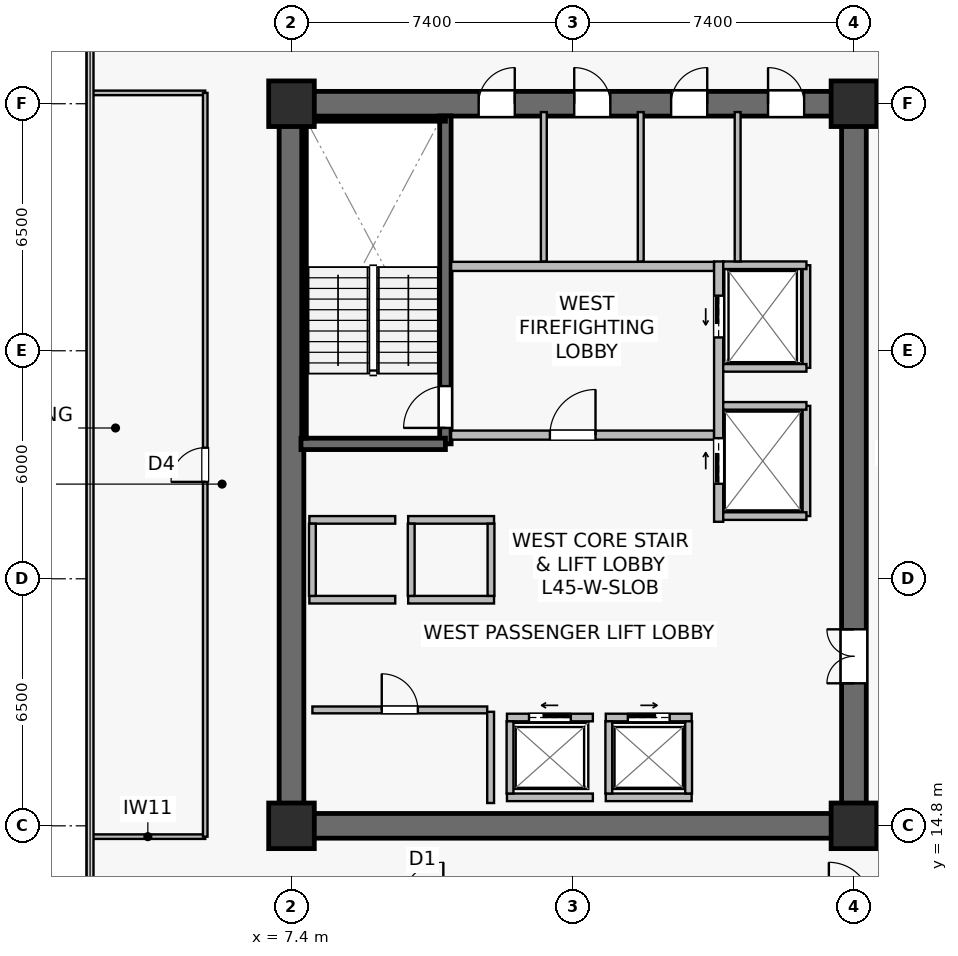
"""IFC4 building model, lengths in metres.
Left out: names, types, materials, properties, quantities, classifications, styles, units other than length and angle.
Written with IfcOpenShell. Run it as: python <this file> out.ifc"""

import sys

from ifc_helpers import new_model, si_unit, direction, frame, frame_2d, origin, origin_2d, place, context, subcontext, project, spatial, rectangle, extrude, source, transform, mapped, element, fill, save


model = new_model("IFC4")
c1 = context("Model", 3, precision=1e-05, world=origin(), true_north=direction((0.0, 1.0)))
c2 = subcontext(c1, "Body", "Model", "MODEL_VIEW")
j1 = project(units=[si_unit("LENGTHUNIT", "METRE"), si_unit("PLANEANGLEUNIT", "RADIAN")], contexts=[c1])
p1 = place(None, origin())
s1 = spatial("IfcSite", under=j1, at=p1, CompositionType="ELEMENT")
p2 = place(p1, origin())
s2 = spatial("IfcBuilding", under=s1, at=p2, CompositionType="ELEMENT")
p3 = place(p2, frame((0.0, 0.0, 187.1)))
s3 = spatial("IfcBuildingStorey", under=s2, at=p3, CompositionType="ELEMENT", Elevation=187.1)
p4 = place(p3, frame((7.075, 14.8, 0.0), z_axis=(0.0, 0.0, 1.0), x_axis=(1.0, 0.0, 0.0)))
e1 = element("IfcWall", 1, at=p4, inside=s3, PredefinedType="SHEAR", context=c2, shape_type="SweptSolid", body=[
    extrude(rectangle(XDim=15.45, YDim=0.65, at=frame_2d((7.725, 0.0))), origin(), (0.0, 0.0, 1.0), 3.79),
])
p5 = place(p3, frame((7.075, 33.8, 0.0), z_axis=(0.0, 0.0, 1.0), x_axis=(1.0, 0.0, 0.0)))
e2 = element("IfcWall", 2, at=p5, inside=s3, PredefinedType="SHEAR", context=c2, shape_type="SweptSolid", body=[
    extrude(rectangle(XDim=15.45, YDim=0.65, at=frame_2d((7.725, 0.0))), origin(), (0.0, 0.0, 1.0), 3.79),
])
p6 = place(p5, frame((5.25, 0.0, 0.0)))
e3 = element("IfcOpeningElement", 3, at=p6, cuts=e2, PredefinedType="OPENING", context=c2, shape_type="SweptSolid", body=[
    extrude(rectangle(XDim=0.95, YDim=2.15, at=frame_2d((0.475, 1.075))), frame((0.0, 0.335, 0.0), z_axis=(0.0, -1.0, 0.0), x_axis=(1.0, 0.0, 0.0)), (0.0, 0.0, 1.0), 0.67),
])
p7 = place(p5, frame((7.765, 0.0, 0.0)))
e4 = element("IfcOpeningElement", 4, at=p7, cuts=e2, PredefinedType="OPENING", context=c2, shape_type="SweptSolid", body=[
    extrude(rectangle(XDim=0.95, YDim=2.15, at=frame_2d((0.475, 1.075))), frame((0.0, 0.335, 0.0), z_axis=(0.0, -1.0, 0.0), x_axis=(1.0, 0.0, 0.0)), (0.0, 0.0, 1.0), 0.67),
])
p8 = place(p5, frame((10.315, 0.0, 0.0)))
e5 = element("IfcOpeningElement", 5, at=p8, cuts=e2, PredefinedType="OPENING", context=c2, shape_type="SweptSolid", body=[
    extrude(rectangle(XDim=0.95, YDim=2.15, at=frame_2d((0.475, 1.075))), frame((0.0, 0.335, 0.0), z_axis=(0.0, -1.0, 0.0), x_axis=(1.0, 0.0, 0.0)), (0.0, 0.0, 1.0), 0.67),
])
p9 = place(p5, frame((12.865, 0.0, 0.0)))
e6 = element("IfcOpeningElement", 6, at=p9, cuts=e2, PredefinedType="OPENING", context=c2, shape_type="SweptSolid", body=[
    extrude(rectangle(XDim=0.95, YDim=2.15, at=frame_2d((0.475, 1.075))), frame((0.0, 0.335, 0.0), z_axis=(0.0, -1.0, 0.0), x_axis=(1.0, 0.0, 0.0)), (0.0, 0.0, 1.0), 0.67),
])
p10 = place(p3, frame((7.4, 15.125, 0.0), z_axis=(0.0, 0.0, 1.0), x_axis=(0.0, 1.0, 0.0)))
e7 = element("IfcWall", 7, at=p10, inside=s3, PredefinedType="SHEAR", context=c2, shape_type="SweptSolid", body=[
    extrude(rectangle(XDim=18.35, YDim=0.65, at=frame_2d((9.175, 0.0))), origin(), (0.0, 0.0, 1.0), 3.79),
])
p11 = place(p3, frame((22.2, 15.125, 0.0), z_axis=(0.0, 0.0, 1.0), x_axis=(0.0, 1.0, 0.0)))
e8 = element("IfcWall", 8, at=p11, inside=s3, PredefinedType="SHEAR", context=c2, shape_type="SweptSolid", body=[
    extrude(rectangle(XDim=18.35, YDim=0.65, at=frame_2d((9.175, 0.0))), origin(), (0.0, 0.0, 1.0), 3.79),
])
p12 = place(p11, frame((3.425, 0.0, 0.0)))
e9 = element("IfcOpeningElement", 9, at=p12, cuts=e8, PredefinedType="OPENING", context=c2, shape_type="SweptSolid", body=[
    extrude(rectangle(XDim=1.42, YDim=2.2, at=frame_2d((0.71, 1.1))), frame((0.0, 0.335, 0.0), z_axis=(0.0, -1.0, 0.0), x_axis=(1.0, 0.0, 0.0)), (0.0, 0.0, 1.0), 0.67),
])
p13 = place(p3, frame((11.45, 24.85, 0.0), z_axis=(0.0, 0.0, 1.0), x_axis=(0.0, 1.0, 0.0)))
e10 = element("IfcWall", 10, at=p13, inside=s3, PredefinedType="SHEAR", context=c2, shape_type="SweptSolid", body=[
    extrude(rectangle(XDim=8.63, YDim=0.3, at=frame_2d((4.315, 0.0))), origin(), (0.0, 0.0, 1.0), 3.79),
])
p14 = place(p13, frame((0.42, 0.0, 0.0)))
e11 = element("IfcOpeningElement", 11, at=p14, cuts=e10, PredefinedType="OPENING", context=c2, shape_type="SweptSolid", body=[
    extrude(rectangle(XDim=1.1, YDim=2.15, at=frame_2d((0.55, 1.075))), frame((0.0, 0.16, 0.0), z_axis=(0.0, -1.0, 0.0), x_axis=(1.0, 0.0, 0.0)), (0.0, 0.0, 1.0), 0.32),
])
p15 = place(p3, frame((7.65, 24.85, 0.0), z_axis=(0.0, 0.0, 1.0), x_axis=(1.0, 0.0, 0.0)))
e12 = element("IfcWall", 12, at=p15, inside=s3, PredefinedType="SHEAR", context=c2, shape_type="SweptSolid", body=[
    extrude(rectangle(XDim=3.8, YDim=0.3, at=frame_2d((1.9, 0.0))), origin(), (0.0, 0.0, 1.0), 3.79),
])
p16 = place(p3, frame((7.73, 33.4, 0.0), z_axis=(0.0, 0.0, 1.0), x_axis=(1.0, 0.0, 0.0)))
e13 = element("IfcWall", 13, at=p16, inside=s3, PredefinedType="SOLIDWALL", context=c2, shape_type="SweptSolid", body=[
    extrude(rectangle(XDim=3.72, YDim=0.12, at=frame_2d((1.86, 0.0))), origin(), (0.0, 0.0, 1.0), 3.79),
])
p17 = place(p3, frame((7.73, 25.0, 0.0), z_axis=(0.0, 0.0, 1.0), x_axis=(0.0, 1.0, 0.0)))
e14 = element("IfcWall", 14, at=p17, inside=s3, PredefinedType="SOLIDWALL", context=c2, shape_type="SweptSolid", body=[
    extrude(rectangle(XDim=8.32, YDim=0.12, at=frame_2d((4.16, 0.0))), origin(), (0.0, 0.0, 1.0), 3.79),
])
m1 = source(origin(), c2, "Body", "SweptSolid", [
    extrude(rectangle(XDim=1.2, YDim=1.2, at=origin_2d()), origin(), (0.0, 0.0, 1.0), 4.1),
])
for number, where, z_axis, x_axis in (
    (15, (7.4, 14.8, 0.0), (0.0, 0.0, 1.0), (1.0, 0.0, 0.0)),
    (16, (22.2, 14.8, 0.0), (0.0, 0.0, 1.0), (1.0, 0.0, 0.0)),
    (17, (7.4, 33.8, 0.0), (0.0, 0.0, 1.0), (1.0, 0.0, 0.0)),
    (18, (22.2, 33.8, 0.0), (0.0, 0.0, 1.0), (1.0, 0.0, 0.0)),
):
    element("IfcColumn", number, at=place(p3, frame(where, z_axis=z_axis, x_axis=x_axis)), inside=s3, PredefinedType="COLUMN", context=c2, shape_type="MappedRepresentation", body=[
        mapped(m1, transform((0.0, 0.0, 0.0), scale=1.0)),
    ])
p18 = place(p3, frame((11.6, 25.08, 0.0), z_axis=(0.0, 0.0, 1.0), x_axis=(1.0, 0.0, 0.0)))
e19 = element("IfcWall", 19, at=p18, inside=s3, PredefinedType="SOLIDWALL", context=c2, shape_type="SweptSolid", body=[
    extrude(rectangle(XDim=6.92, YDim=0.24, at=frame_2d((3.46, 0.0))), origin(), (0.0, 0.0, 1.0), 3.187),
])
p19 = place(p18, frame((2.6, 0.0, 0.0)))
e20 = element("IfcOpeningElement", 20, at=p19, cuts=e19, PredefinedType="OPENING", context=c2, shape_type="SweptSolid", body=[
    extrude(rectangle(XDim=1.2, YDim=2.16, at=frame_2d((0.6, 1.08))), frame((0.0, 0.13, 0.0), z_axis=(0.0, -1.0, 0.0), x_axis=(1.0, 0.0, 0.0)), (0.0, 0.0, 1.0), 0.26),
])
p20 = place(p3, frame((11.6, 29.52, 0.0), z_axis=(0.0, 0.0, 1.0), x_axis=(1.0, 0.0, 0.0)))
e21 = element("IfcWall", 21, at=p20, inside=s3, PredefinedType="SOLIDWALL", context=c2, shape_type="SweptSolid", body=[
    extrude(rectangle(XDim=6.92, YDim=0.24, at=frame_2d((3.46, 0.0))), origin(), (0.0, 0.0, 1.0), 3.187),
])
p21 = place(p3, frame((18.64, 22.8, 0.0), z_axis=(0.0, 0.0, 1.0), x_axis=(0.0, 1.0, 0.0)))
e22 = element("IfcWall", 22, at=p21, inside=s3, PredefinedType="SOLIDWALL", context=c2, shape_type="SweptSolid", body=[
    extrude(rectangle(XDim=6.85, YDim=0.24, at=frame_2d((3.425, 0.0))), origin(), (0.0, 0.0, 1.0), 2.925),
])
p22 = place(p21, frame((4.85, 0.0, 0.0)))
e23 = element("IfcOpeningElement", 23, at=p22, cuts=e22, PredefinedType="OPENING", context=c2, shape_type="SweptSolid", body=[
    extrude(rectangle(XDim=1.1, YDim=2.22, at=frame_2d((0.55, 1.11))), frame((0.0, 0.13, 0.0), z_axis=(0.0, -1.0, 0.0), x_axis=(1.0, 0.0, 0.0)), (0.0, 0.0, 1.0), 0.26),
])
p23 = place(p21, frame((1.0, 0.0, 0.0)))
e24 = element("IfcOpeningElement", 24, at=p23, cuts=e22, PredefinedType="OPENING", context=c2, shape_type="SweptSolid", body=[
    extrude(rectangle(XDim=1.2, YDim=2.22, at=frame_2d((0.6, 1.11))), frame((0.0, 0.13, 0.0), z_axis=(0.0, -1.0, 0.0), x_axis=(1.0, 0.0, 0.0)), (0.0, 0.0, 1.0), 0.26),
])
p24 = place(p3, frame((13.07, 17.65, 0.0), z_axis=(0.0, 0.0, 1.0), x_axis=(1.0, 0.0, 0.0)))
e25 = element("IfcWall", 25, at=p24, inside=s3, PredefinedType="SOLIDWALL", context=c2, shape_type="SweptSolid", body=[
    extrude(rectangle(XDim=2.26, YDim=0.2, at=frame_2d((1.13, 0.0))), origin(), (0.0, 0.0, 1.0), 3.187),
])
p25 = place(p24, frame((0.58, 0.0, 0.0)))
e26 = element("IfcOpeningElement", 26, at=p25, cuts=e25, PredefinedType="OPENING", context=c2, shape_type="SweptSolid", body=[
    extrude(rectangle(XDim=1.1, YDim=2.22, at=frame_2d((0.55, 1.11))), frame((0.0, 0.11, 0.0), z_axis=(0.0, -1.0, 0.0), x_axis=(1.0, 0.0, 0.0)), (0.0, 0.0, 1.0), 0.22),
])
p26 = place(p3, frame((13.07, 15.55, 0.0), z_axis=(0.0, 0.0, 1.0), x_axis=(1.0, 0.0, 0.0)))
e27 = element("IfcWall", 27, at=p26, inside=s3, PredefinedType="SOLIDWALL", context=c2, shape_type="SweptSolid", body=[
    extrude(rectangle(XDim=2.26, YDim=0.2, at=frame_2d((1.13, 0.0))), origin(), (0.0, 0.0, 1.0), 3.187),
])
p27 = place(p3, frame((13.15, 15.65, 0.0), z_axis=(0.0, 0.0, 1.0), x_axis=(0.0, 1.0, 0.0)))
e28 = element("IfcWall", 28, at=p27, inside=s3, PredefinedType="SOLIDWALL", context=c2, shape_type="SweptSolid", body=[
    extrude(rectangle(XDim=1.9, YDim=0.18, at=frame_2d((0.95, 0.0))), origin(), (0.0, 0.0, 1.0), 3.79),
])
p28 = place(p3, frame((15.67, 17.65, 0.0), z_axis=(0.0, 0.0, 1.0), x_axis=(1.0, 0.0, 0.0)))
e29 = element("IfcWall", 29, at=p28, inside=s3, PredefinedType="SOLIDWALL", context=c2, shape_type="SweptSolid", body=[
    extrude(rectangle(XDim=2.26, YDim=0.2, at=frame_2d((1.13, 0.0))), origin(), (0.0, 0.0, 1.0), 3.79),
])
p29 = place(p28, frame((0.58, 0.0, 0.0)))
e30 = element("IfcOpeningElement", 30, at=p29, cuts=e29, PredefinedType="OPENING", context=c2, shape_type="SweptSolid", body=[
    extrude(rectangle(XDim=1.1, YDim=2.22, at=frame_2d((0.55, 1.11))), frame((0.0, 0.11, 0.0), z_axis=(0.0, -1.0, 0.0), x_axis=(1.0, 0.0, 0.0)), (0.0, 0.0, 1.0), 0.22),
])
p30 = place(p3, frame((15.67, 15.55, 0.0), z_axis=(0.0, 0.0, 1.0), x_axis=(1.0, 0.0, 0.0)))
e31 = element("IfcWall", 31, at=p30, inside=s3, PredefinedType="SOLIDWALL", context=c2, shape_type="SweptSolid", body=[
    extrude(rectangle(XDim=2.26, YDim=0.2, at=frame_2d((1.13, 0.0))), origin(), (0.0, 0.0, 1.0), 3.79),
])
for number, where, z_axis, x_axis in (
    (32, (15.75, 15.65, 0.0), (0.0, 0.0, 1.0), (0.0, 1.0, 0.0)),
    (33, (17.85, 15.65, 0.0), (0.0, 0.0, 1.0), (0.0, 1.0, 0.0)),
):
    element("IfcWall", number, at=place(p3, frame(where, z_axis=z_axis, x_axis=x_axis)), inside=s3, PredefinedType="SOLIDWALL", context=c2, shape_type="SweptSolid", body=[
        extrude(rectangle(XDim=1.9, YDim=0.18, at=frame_2d((0.95, 0.0))), origin(), (0.0, 0.0, 1.0), 3.79),
    ])
for number, where, z_axis, x_axis in (
    (34, (7.87, 20.75, 0.0), (0.0, 0.0, 1.0), (1.0, 0.0, 0.0)),
    (35, (7.87, 22.85, 0.0), (0.0, 0.0, 1.0), (1.0, 0.0, 0.0)),
):
    element("IfcWall", number, at=place(p3, frame(where, z_axis=z_axis, x_axis=x_axis)), inside=s3, PredefinedType="SOLIDWALL", context=c2, shape_type="SweptSolid", body=[
        extrude(rectangle(XDim=2.26, YDim=0.2, at=frame_2d((1.13, 0.0))), origin(), (0.0, 0.0, 1.0), 3.79),
    ])
p31 = place(p3, frame((7.95, 20.85, 0.0), z_axis=(0.0, 0.0, 1.0), x_axis=(0.0, 1.0, 0.0)))
e36 = element("IfcWall", 36, at=p31, inside=s3, PredefinedType="SOLIDWALL", context=c2, shape_type="SweptSolid", body=[
    extrude(rectangle(XDim=1.9, YDim=0.18, at=frame_2d((0.95, 0.0))), origin(), (0.0, 0.0, 1.0), 3.79),
])
for number, where, z_axis, x_axis in (
    (37, (10.47, 20.75, 0.0), (0.0, 0.0, 1.0), (1.0, 0.0, 0.0)),
    (38, (10.47, 22.85, 0.0), (0.0, 0.0, 1.0), (1.0, 0.0, 0.0)),
):
    element("IfcWall", number, at=place(p3, frame(where, z_axis=z_axis, x_axis=x_axis)), inside=s3, PredefinedType="SOLIDWALL", context=c2, shape_type="SweptSolid", body=[
        extrude(rectangle(XDim=2.26, YDim=0.2, at=frame_2d((1.13, 0.0))), origin(), (0.0, 0.0, 1.0), 3.79),
    ])
for number, where, z_axis, x_axis in (
    (39, (10.55, 20.85, 0.0), (0.0, 0.0, 1.0), (0.0, 1.0, 0.0)),
    (40, (12.65, 20.85, 0.0), (0.0, 0.0, 1.0), (0.0, 1.0, 0.0)),
):
    element("IfcWall", number, at=place(p3, frame(where, z_axis=z_axis, x_axis=x_axis)), inside=s3, PredefinedType="SOLIDWALL", context=c2, shape_type="SweptSolid", body=[
        extrude(rectangle(XDim=1.9, YDim=0.18, at=frame_2d((0.95, 0.0))), origin(), (0.0, 0.0, 1.0), 3.79),
    ])
p32 = place(p3, frame((20.95, 26.85, 0.0), z_axis=(0.0, 0.0, 1.0), x_axis=(0.0, 1.0, 0.0)))
e41 = element("IfcWall", 41, at=p32, inside=s3, PredefinedType="SOLIDWALL", context=c2, shape_type="SweptSolid", body=[
    extrude(rectangle(XDim=2.7, YDim=0.2, at=frame_2d((1.35, 0.0))), origin(), (0.0, 0.0, 1.0), 3.79),
])
p33 = place(p3, frame((18.76, 29.55, 0.0), z_axis=(0.0, 0.0, 1.0), x_axis=(1.0, 0.0, 0.0)))
e42 = element("IfcWall", 42, at=p33, inside=s3, PredefinedType="SOLIDWALL", context=c2, shape_type="SweptSolid", body=[
    extrude(rectangle(XDim=2.19, YDim=0.2, at=frame_2d((1.095, 0.0))), origin(), (0.0, 0.0, 1.0), 3.79),
])
p34 = place(p3, frame((18.76, 26.85, 0.0), z_axis=(0.0, 0.0, 1.0), x_axis=(1.0, 0.0, 0.0)))
e43 = element("IfcWall", 43, at=p34, inside=s3, PredefinedType="SOLIDWALL", context=c2, shape_type="SweptSolid", body=[
    extrude(rectangle(XDim=2.19, YDim=0.2, at=frame_2d((1.095, 0.0))), origin(), (0.0, 0.0, 1.0), 3.187),
])
p35 = place(p3, frame((20.95, 22.95, 0.0), z_axis=(0.0, 0.0, 1.0), x_axis=(0.0, 1.0, 0.0)))
e44 = element("IfcWall", 44, at=p35, inside=s3, PredefinedType="SOLIDWALL", context=c2, shape_type="SweptSolid", body=[
    extrude(rectangle(XDim=2.9, YDim=0.2, at=frame_2d((1.45, 0.0))), origin(), (0.0, 0.0, 1.0), 2.925),
])
for number, where, z_axis, x_axis in (
    (45, (18.76, 25.85, 0.0), (0.0, 0.0, 1.0), (1.0, 0.0, 0.0)),
    (46, (18.76, 22.95, 0.0), (0.0, 0.0, 1.0), (1.0, 0.0, 0.0)),
):
    element("IfcWall", number, at=place(p3, frame(where, z_axis=z_axis, x_axis=x_axis)), inside=s3, PredefinedType="SOLIDWALL", context=c2, shape_type="SweptSolid", body=[
        extrude(rectangle(XDim=2.19, YDim=0.2, at=frame_2d((1.095, 0.0))), origin(), (0.0, 0.0, 1.0), 3.79),
    ])
p36 = place(p3, frame((7.95, 17.85, 0.0), z_axis=(0.0, 0.0, 1.0), x_axis=(1.0, 0.0, 0.0)))
e47 = element("IfcWall", 47, at=p36, inside=s3, PredefinedType="SOLIDWALL", context=c2, shape_type="SweptSolid", body=[
    extrude(rectangle(XDim=4.6, YDim=0.18, at=frame_2d((2.3, 0.0))), origin(), (0.0, 0.0, 1.0), 3.79),
])
p37 = place(p36, frame((1.825, 0.0, 0.0)))
e48 = element("IfcOpeningElement", 48, at=p37, cuts=e47, PredefinedType="OPENING", context=c2, shape_type="SweptSolid", body=[
    extrude(rectangle(XDim=0.95, YDim=2.15, at=frame_2d((0.475, 1.075))), frame((0.0, 0.1, 0.0), z_axis=(0.0, -1.0, 0.0), x_axis=(1.0, 0.0, 0.0)), (0.0, 0.0, 1.0), 0.2),
])
p38 = place(p3, frame((12.64, 15.4, 0.0), z_axis=(0.0, 0.0, 1.0), x_axis=(0.0, 1.0, 0.0)))
e49 = element("IfcWall", 49, at=p38, inside=s3, PredefinedType="SOLIDWALL", context=c2, shape_type="SweptSolid", body=[
    extrude(rectangle(XDim=2.4, YDim=0.18, at=frame_2d((1.2, 0.0))), origin(), (0.0, 0.0, 1.0), 3.79),
])
for number, where, z_axis, x_axis in (
    (50, (14.04, 29.65, 0.0), (0.0, 0.0, 1.0), (0.0, 1.0, 0.0)),
    (51, (16.59, 29.65, 0.0), (0.0, 0.0, 1.0), (0.0, 1.0, 0.0)),
    (52, (19.14, 29.65, 0.0), (0.0, 0.0, 1.0), (0.0, 1.0, 0.0)),
):
    element("IfcWall", number, at=place(p3, frame(where, z_axis=z_axis, x_axis=x_axis)), inside=s3, PredefinedType="PLUMBINGWALL", context=c2, shape_type="SweptSolid", body=[
        extrude(rectangle(XDim=3.93, YDim=0.155, at=frame_2d((1.965, 0.0))), origin(), (0.0, 0.0, 1.0), 3.79),
    ])
for number, where, z_axis, x_axis in (
    (53, (2.11, 14.515, 0.0), (0.0, 0.0, 1.0), (1.0, 0.0, 0.0)),
    (54, (2.11, 34.085, 0.0), (0.0, 0.0, 1.0), (1.0, 0.0, 0.0)),
):
    element("IfcWall", number, at=place(p3, frame(where, z_axis=z_axis, x_axis=x_axis)), inside=s3, PredefinedType="PARTITIONING", context=c2, shape_type="SweptSolid", body=[
        extrude(rectangle(XDim=3.02, YDim=0.12, at=frame_2d((1.51, 0.0))), origin(), (0.0, 0.0, 1.0), 3.79),
    ])
p39 = place(p3, frame((5.13, 14.515, 0.0), z_axis=(0.0, 0.0, 1.0), x_axis=(0.0, 1.0, 0.0)))
e55 = element("IfcWall", 55, at=p39, inside=s3, PredefinedType="PARTITIONING", context=c2, shape_type="SweptSolid", body=[
    extrude(rectangle(XDim=19.57, YDim=0.12, at=frame_2d((9.785, 0.0))), origin(), (0.0, 0.0, 1.0), 3.79),
])
p40 = place(p39, frame((9.335, 0.0, 0.0)))
e56 = element("IfcOpeningElement", 56, at=p40, cuts=e55, PredefinedType="OPENING", context=c2, shape_type="SweptSolid", body=[
    extrude(rectangle(XDim=0.9, YDim=2.1, at=frame_2d((0.45, 1.05))), frame((0.0, 0.07, 0.0), z_axis=(0.0, -1.0, 0.0), x_axis=(1.0, 0.0, 0.0)), (0.0, 0.0, 1.0), 0.14),
])
m2 = source(origin(), c2, "Body", "SweptSolid", [
    extrude(rectangle(XDim=1.1, YDim=2.15, at=frame_2d((0.55, 1.075))), frame((0.0, 0.025, 0.0), z_axis=(0.0, -1.0, 0.0), x_axis=(1.0, 0.0, 0.0)), (0.0, 0.0, 1.0), 0.05),
])
p41 = place(p14, origin())
e57 = element("IfcDoor", 57, at=p41, inside=s3, OperationType="SINGLE_SWING_LEFT", PredefinedType="DOOR", context=c2, shape_type="MappedRepresentation", body=[
    mapped(m2, transform((0.0, 0.0, 0.0), scale=1.0)),
])
fill(e11, e57)
m3 = source(origin(), c2, "Body", "SweptSolid", [
    extrude(rectangle(XDim=1.2, YDim=2.16, at=frame_2d((0.6, 1.08))), frame((0.0, 0.025, 0.0), z_axis=(0.0, -1.0, 0.0), x_axis=(1.0, 0.0, 0.0)), (0.0, 0.0, 1.0), 0.05),
])
p42 = place(p19, origin())
e58 = element("IfcDoor", 58, at=p42, inside=s3, OperationType="SINGLE_SWING_RIGHT", PredefinedType="DOOR", context=c2, shape_type="MappedRepresentation", body=[
    mapped(m3, transform((0.0, 0.0, 0.0), scale=1.0)),
])
fill(e20, e58)
m4 = source(origin(), c2, "Body", "SweptSolid", [
    extrude(rectangle(XDim=1.1, YDim=2.22, at=frame_2d((0.55, 1.11))), frame((0.0, 0.025, 0.0), z_axis=(0.0, -1.0, 0.0), x_axis=(1.0, 0.0, 0.0)), (0.0, 0.0, 1.0), 0.05),
])
p43 = place(p25, origin())
e59 = element("IfcDoor", 59, at=p43, inside=s3, OperationType="SLIDING_TO_LEFT", PredefinedType="USERDEFINED", context=c2, shape_type="MappedRepresentation", body=[
    mapped(m4, transform((0.0, 0.0, 0.0), scale=1.0)),
])
fill(e26, e59)
p44 = place(p29, origin())
e60 = element("IfcDoor", 60, at=p44, inside=s3, OperationType="SLIDING_TO_RIGHT", PredefinedType="USERDEFINED", context=c2, shape_type="MappedRepresentation", body=[
    mapped(m4, transform((0.0, 0.0, 0.0), scale=1.0)),
])
fill(e30, e60)
p45 = place(p22, origin())
e61 = element("IfcDoor", 61, at=p45, inside=s3, OperationType="SLIDING_TO_LEFT", PredefinedType="USERDEFINED", context=c2, shape_type="MappedRepresentation", body=[
    mapped(m4, transform((0.0, 0.0, 0.0), scale=1.0)),
])
fill(e23, e61)
m5 = source(origin(), c2, "Body", "SweptSolid", [
    extrude(rectangle(XDim=1.2, YDim=2.22, at=frame_2d((0.6, 1.11))), frame((0.0, 0.025, 0.0), z_axis=(0.0, -1.0, 0.0), x_axis=(1.0, 0.0, 0.0)), (0.0, 0.0, 1.0), 0.05),
])
p46 = place(p23, origin())
e62 = element("IfcDoor", 62, at=p46, inside=s3, OperationType="SLIDING_TO_RIGHT", PredefinedType="USERDEFINED", context=c2, shape_type="MappedRepresentation", body=[
    mapped(m5, transform((0.0, 0.0, 0.0), scale=1.0)),
])
fill(e24, e62)
m6 = source(origin(), c2, "Body", "SweptSolid", [
    extrude(rectangle(XDim=0.95, YDim=2.15, at=frame_2d((0.475, 1.075))), frame((0.0, 0.025, 0.0), z_axis=(0.0, -1.0, 0.0), x_axis=(1.0, 0.0, 0.0)), (0.0, 0.0, 1.0), 0.05),
])
p47 = place(p37, origin())
e63 = element("IfcDoor", 63, at=p47, inside=s3, OperationType="SINGLE_SWING_LEFT", PredefinedType="DOOR", context=c2, shape_type="MappedRepresentation", body=[
    mapped(m6, transform((0.0, 0.0, 0.0), scale=1.0)),
])
fill(e48, e63)
m7 = source(origin(), c2, "Body", "SweptSolid", [
    extrude(rectangle(XDim=1.42, YDim=2.2, at=frame_2d((0.71, 1.1))), frame((0.0, 0.025, 0.0), z_axis=(0.0, -1.0, 0.0), x_axis=(1.0, 0.0, 0.0)), (0.0, 0.0, 1.0), 0.05),
])
p48 = place(p12, origin())
e64 = element("IfcDoor", 64, at=p48, inside=s3, OperationType="DOUBLE_DOOR_SINGLE_SWING", PredefinedType="DOOR", context=c2, shape_type="MappedRepresentation", body=[
    mapped(m7, transform((0.0, 0.0, 0.0), scale=1.0)),
])
fill(e9, e64)
p49 = place(p6, origin())
e65 = element("IfcDoor", 65, at=p49, inside=s3, OperationType="SINGLE_SWING_RIGHT", PredefinedType="DOOR", context=c2, shape_type="MappedRepresentation", body=[
    mapped(m6, transform((0.0, 0.0, 0.0), scale=1.0)),
])
fill(e3, e65)
p50 = place(p7, origin())
e66 = element("IfcDoor", 66, at=p50, inside=s3, OperationType="SINGLE_SWING_LEFT", PredefinedType="DOOR", context=c2, shape_type="MappedRepresentation", body=[
    mapped(m6, transform((0.0, 0.0, 0.0), scale=1.0)),
])
fill(e4, e66)
p51 = place(p8, origin())
e67 = element("IfcDoor", 67, at=p51, inside=s3, OperationType="SINGLE_SWING_RIGHT", PredefinedType="DOOR", context=c2, shape_type="MappedRepresentation", body=[
    mapped(m6, transform((0.0, 0.0, 0.0), scale=1.0)),
])
fill(e5, e67)
p52 = place(p9, origin())
e68 = element("IfcDoor", 68, at=p52, inside=s3, OperationType="SINGLE_SWING_LEFT", PredefinedType="DOOR", context=c2, shape_type="MappedRepresentation", body=[
    mapped(m6, transform((0.0, 0.0, 0.0), scale=1.0)),
])
fill(e6, e68)
m8 = source(origin(), c2, "Body", "SweptSolid", [
    extrude(rectangle(XDim=0.9, YDim=2.1, at=frame_2d((0.45, 1.05))), frame((0.0, 0.025, 0.0), z_axis=(0.0, -1.0, 0.0), x_axis=(1.0, 0.0, 0.0)), (0.0, 0.0, 1.0), 0.05),
])
p53 = place(p40, origin())
e69 = element("IfcDoor", 69, at=p53, inside=s3, OperationType="SINGLE_SWING_LEFT", PredefinedType="DOOR", context=c2, shape_type="MappedRepresentation", body=[
    mapped(m8, transform((0.0, 0.0, 0.0), scale=1.0)),
])
fill(e56, e69)
save(model, sys.argv[1])
